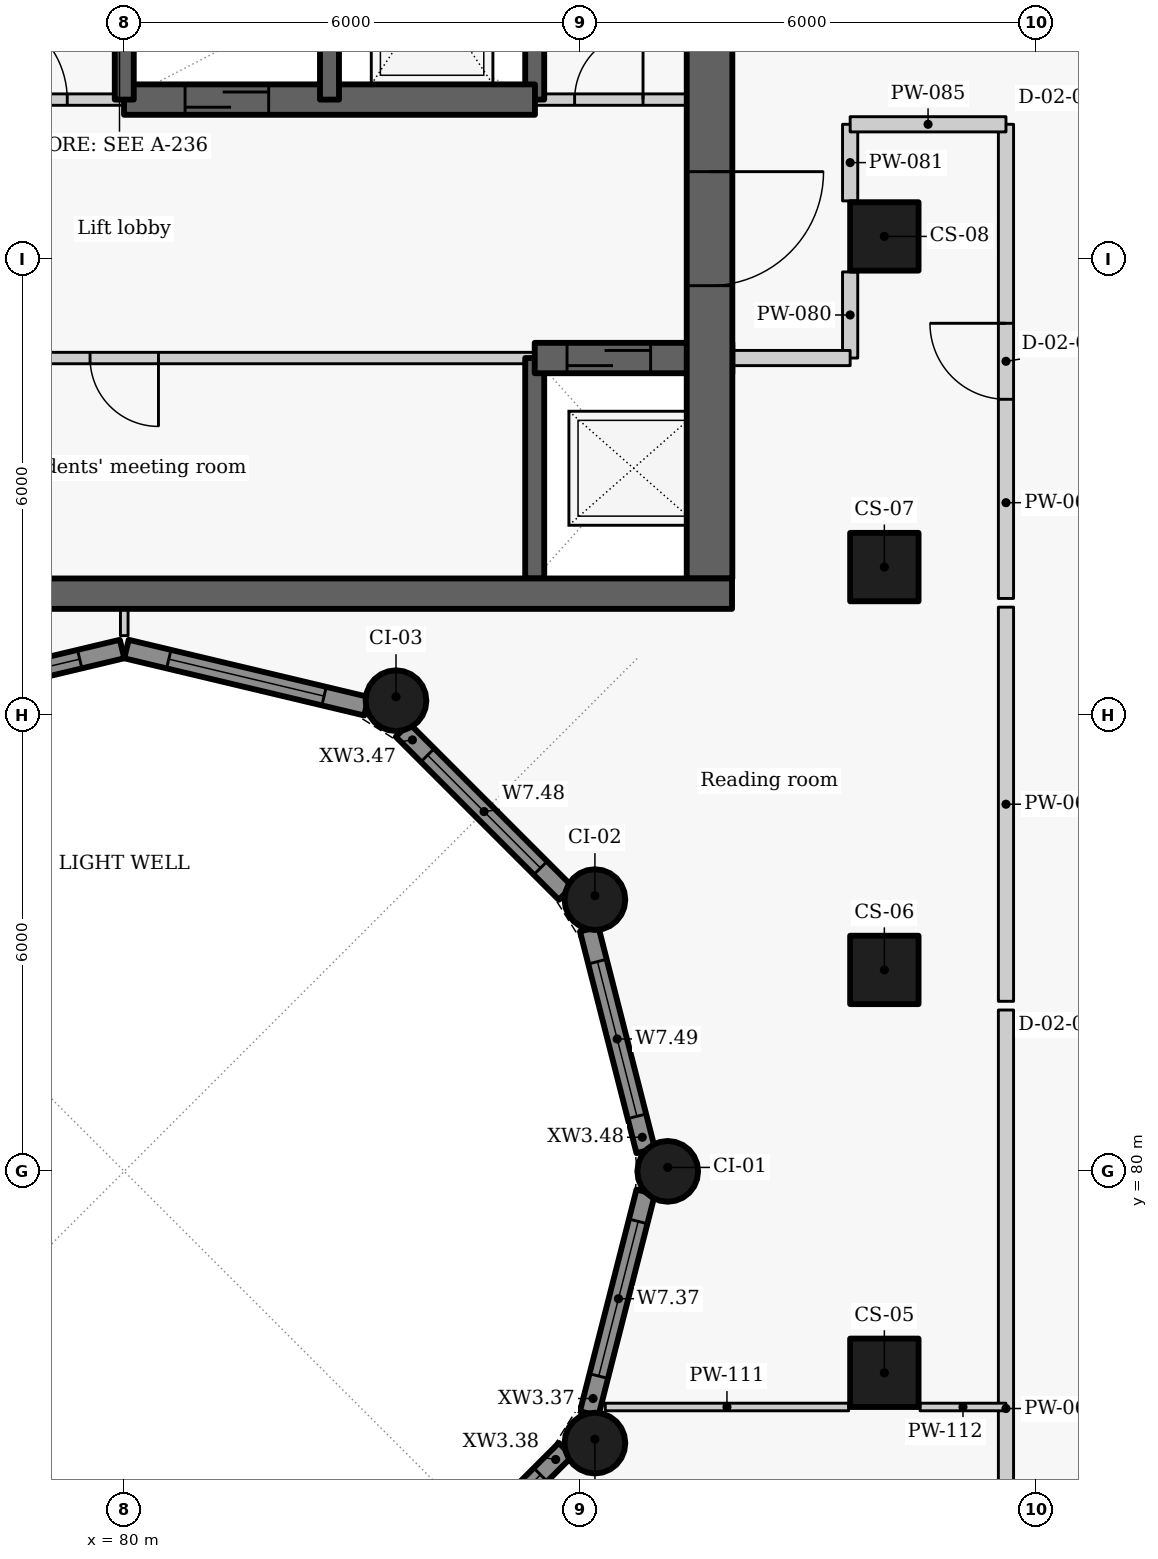
"""IFC4 building model, lengths in metres.
Left out: names, types, materials, properties, quantities, classifications, styles, units other than length and angle.
Written with IfcOpenShell. Run it as: python <this file> out.ifc"""

import sys

from ifc_helpers import new_model, si_unit, direction, frame, frame_2d, origin, origin_2d, place, context, subcontext, project, spatial, rectangle, circle, extrude, element, fill, save


model = new_model("IFC4")
c1 = context("Model", 3, precision=1e-05, world=origin(), true_north=direction((0.0, 1.0)))
c2 = subcontext(c1, "Body", "Model", "MODEL_VIEW")
j1 = project(units=[si_unit("LENGTHUNIT", "METRE"), si_unit("PLANEANGLEUNIT", "RADIAN")], contexts=[c1])
p1 = place(None, origin())
s1 = spatial("IfcSite", under=j1, at=p1, CompositionType="ELEMENT")
p2 = place(p1, origin())
s2 = spatial("IfcBuilding", under=s1, at=p2, CompositionType="ELEMENT")
p3 = place(p2, frame((0.0, 0.0, 213.0)))
s3 = spatial("IfcBuildingStorey", under=s2, at=p3, CompositionType="ELEMENT", Elevation=213.0)
for number, where, z_axis, x_axis in (
    (1, (90.0, 77.35, 0.0), (0.0, 0.0, 1.0), (0.0, 1.0, 0.0)),
    (2, (90.0, 82.65, 0.0), (0.0, 0.0, 1.0), (0.0, 1.0, 0.0)),
    (3, (90.0, 87.95, 0.0), (0.0, 0.0, 1.0), (0.0, 1.0, 0.0)),
    (4, (90.0, 92.3, 0.0), (0.0, 0.0, 1.0), (0.0, 1.0, 0.0)),
):
    element("IfcColumn", number, at=place(p3, frame(where, z_axis=z_axis, x_axis=x_axis)), inside=s3, PredefinedType="COLUMN", context=c2, shape_type="SweptSolid", body=[
        extrude(rectangle(XDim=0.9, YDim=0.9, at=origin_2d()), origin(), (0.0, 0.0, 1.0), 3.3),
    ])
for number, where, z_axis, x_axis in (
    (5, (87.15, 80.0, 0.0), (0.0, 0.0, 1.0), (0.0, 1.0, 0.0)),
    (6, (86.192, 83.575, 0.0), (0.0, 0.0, 1.0), (-0.5, 0.866, 0.0)),
    (7, (83.575, 86.192, 0.0), (0.0, 0.0, 1.0), (-0.866, 0.5, 0.0)),
    (8, (86.192, 76.425, 0.0), (0.0, 0.0, 1.0), (0.5, 0.866, 0.0)),
):
    element("IfcColumn", number, at=place(p3, frame(where, z_axis=z_axis, x_axis=x_axis)), inside=s3, PredefinedType="COLUMN", context=c2, shape_type="SweptSolid", body=[
        extrude(circle(Radius=0.4, at=origin_2d()), origin(), (0.0, 0.0, 1.0), 3.3),
    ])
p4 = place(p3, frame((86.86, 79.73, 0.0), z_axis=(0.0, 0.0, 1.0), x_axis=(-0.247055971283, -0.969001211069, 0.0)))
e9 = element("IfcWall", 9, at=p4, inside=s3, PredefinedType="SOLIDWALL", context=c2, shape_type="SweptSolid", body=[
    extrude(rectangle(XDim=3.01, YDim=0.25, at=frame_2d((1.505, 0.0))), origin(), (0.0, 0.0, 1.0), 2.425),
])
p5 = place(p4, frame((0.401, 0.0, 0.9)))
e10 = element("IfcOpeningElement", 10, at=p5, cuts=e9, PredefinedType="OPENING", context=c2, shape_type="SweptSolid", body=[
    extrude(rectangle(XDim=2.1, YDim=1.1, at=frame_2d((1.05, 0.55))), frame((0.0, 0.135, 0.0), z_axis=(0.0, -1.0, 0.0), x_axis=(1.0, 0.0, 0.0)), (0.0, 0.0, 1.0), 0.27),
])
p6 = place(p3, frame((85.806, 76.339, 0.0), z_axis=(0.0, 0.0, 1.0), x_axis=(-0.707106781187, -0.707106781187, 0.0)))
e11 = element("IfcWall", 11, at=p6, inside=s3, PredefinedType="SOLIDWALL", context=c2, shape_type="SweptSolid", body=[
    extrude(rectangle(XDim=3.033, YDim=0.25, at=frame_2d((1.517, 0.0))), origin(), (0.0, 0.0, 1.0), 2.425),
])
p7 = place(p6, frame((0.467, 0.0, 0.9)))
e12 = element("IfcOpeningElement", 12, at=p7, cuts=e11, PredefinedType="OPENING", context=c2, shape_type="SweptSolid", body=[
    extrude(rectangle(XDim=2.1, YDim=1.1, at=frame_2d((1.05, 0.55))), frame((0.0, 0.135, 0.0), z_axis=(0.0, -1.0, 0.0), x_axis=(1.0, 0.0, 0.0)), (0.0, 0.0, 1.0), 0.27),
])
p8 = place(p3, frame((76.814, 86.119, 0.0), z_axis=(0.0, 0.0, 1.0), x_axis=(0.972773113459, 0.231759508395, 0.0)))
e13 = element("IfcWall", 13, at=p8, inside=s3, PredefinedType="SOLIDWALL", context=c2, shape_type="SweptSolid", body=[
    extrude(rectangle(XDim=3.246, YDim=0.25, at=frame_2d((1.623, 0.0))), origin(), (0.0, 0.0, 1.0), 2.425),
])
p9 = place(p8, frame((0.573, 0.0, 0.9)))
e14 = element("IfcOpeningElement", 14, at=p9, cuts=e13, PredefinedType="OPENING", context=c2, shape_type="SweptSolid", body=[
    extrude(rectangle(XDim=2.1, YDim=1.1, at=frame_2d((1.05, 0.55))), frame((0.0, 0.135, 0.0), z_axis=(0.0, -1.0, 0.0), x_axis=(1.0, 0.0, 0.0)), (0.0, 0.0, 1.0), 0.27),
])
p10 = place(p3, frame((80.029, 86.872, 0.0), z_axis=(0.0, 0.0, 1.0), x_axis=(0.972773113459, -0.231759508395, 0.0)))
e15 = element("IfcWall", 15, at=p10, inside=s3, PredefinedType="SOLIDWALL", context=c2, shape_type="SweptSolid", body=[
    extrude(rectangle(XDim=3.246, YDim=0.25, at=frame_2d((1.623, 0.0))), origin(), (0.0, 0.0, 1.0), 2.425),
])
p11 = place(p10, frame((0.573, 0.0, 0.9)))
e16 = element("IfcOpeningElement", 16, at=p11, cuts=e15, PredefinedType="OPENING", context=c2, shape_type="SweptSolid", body=[
    extrude(rectangle(XDim=2.1, YDim=1.1, at=frame_2d((1.05, 0.55))), frame((0.0, 0.135, 0.0), z_axis=(0.0, -1.0, 0.0), x_axis=(1.0, 0.0, 0.0)), (0.0, 0.0, 1.0), 0.27),
])
p12 = place(p3, frame((83.661, 85.806, 0.0), z_axis=(0.0, 0.0, 1.0), x_axis=(0.707106781187, -0.707106781187, 0.0)))
e17 = element("IfcWall", 17, at=p12, inside=s3, PredefinedType="SOLIDWALL", context=c2, shape_type="SweptSolid", body=[
    extrude(rectangle(XDim=3.033, YDim=0.25, at=frame_2d((1.517, 0.0))), origin(), (0.0, 0.0, 1.0), 2.425),
])
p13 = place(p12, frame((0.467, 0.0, 0.9)))
e18 = element("IfcOpeningElement", 18, at=p13, cuts=e17, PredefinedType="OPENING", context=c2, shape_type="SweptSolid", body=[
    extrude(rectangle(XDim=2.1, YDim=1.1, at=frame_2d((1.05, 0.55))), frame((0.0, 0.135, 0.0), z_axis=(0.0, -1.0, 0.0), x_axis=(1.0, 0.0, 0.0)), (0.0, 0.0, 1.0), 0.27),
])
p14 = place(p3, frame((86.117, 83.187, 0.0), z_axis=(0.0, 0.0, 1.0), x_axis=(0.247055971283, -0.969001211069, 0.0)))
e19 = element("IfcWall", 19, at=p14, inside=s3, PredefinedType="SOLIDWALL", context=c2, shape_type="SweptSolid", body=[
    extrude(rectangle(XDim=3.01, YDim=0.25, at=frame_2d((1.505, 0.0))), origin(), (0.0, 0.0, 1.0), 2.425),
])
p15 = place(p14, frame((0.441, 0.0, 0.9)))
e20 = element("IfcOpeningElement", 20, at=p15, cuts=e19, PredefinedType="OPENING", context=c2, shape_type="SweptSolid", body=[
    extrude(rectangle(XDim=2.1, YDim=1.1, at=frame_2d((1.05, 0.55))), frame((0.0, 0.135, 0.0), z_axis=(0.0, -1.0, 0.0), x_axis=(1.0, 0.0, 0.0)), (0.0, 0.0, 1.0), 0.27),
])
p16 = place(p3, frame((85.4, 90.7, 0.0), z_axis=(0.0, 0.0, 1.0), x_axis=(-1.0, 0.0, 0.0)))
e21 = element("IfcWall", 21, at=p16, inside=s3, PredefinedType="PARTITIONING", context=c2, shape_type="SweptSolid", body=[
    extrude(rectangle(XDim=13.4, YDim=0.15, at=frame_2d((6.7, 0.0))), origin(), (0.0, 0.0, 1.0), 3.025),
])
p17 = place(p16, frame((11.325, 0.0, 0.0)))
e22 = element("IfcOpeningElement", 22, at=p17, cuts=e21, PredefinedType="OPENING", context=c2, shape_type="SweptSolid", body=[
    extrude(rectangle(XDim=0.9, YDim=2.1, at=frame_2d((0.45, 1.05))), frame((0.0, 0.085, 0.0), z_axis=(0.0, -1.0, 0.0), x_axis=(1.0, 0.0, 0.0)), (0.0, 0.0, 1.0), 0.17),
])
p18 = place(p16, frame((4.95, 0.0, 0.0)))
e23 = element("IfcOpeningElement", 23, at=p18, cuts=e21, PredefinedType="OPENING", context=c2, shape_type="SweptSolid", body=[
    extrude(rectangle(XDim=0.9, YDim=2.1, at=frame_2d((0.45, 1.05))), frame((0.0, 0.085, 0.0), z_axis=(0.0, -1.0, 0.0), x_axis=(1.0, 0.0, 0.0)), (0.0, 0.0, 1.0), 0.17),
])
p19 = place(p3, frame((85.4, 87.8, -0.275), z_axis=(0.0, 0.0, 1.0), x_axis=(0.0, 1.0, 0.0)))
e24 = element("IfcWall", 24, at=p19, inside=s3, PredefinedType="SHEAR", context=c2, shape_type="SweptSolid", body=[
    extrude(rectangle(XDim=2.9, YDim=0.25, at=frame_2d((1.45, 0.0))), origin(), (0.0, 0.0, 1.0), 3.3),
])
p20 = place(p3, frame((85.4, 94.1, -0.275), z_axis=(0.0, 0.0, 1.0), x_axis=(0.0, 1.0, 0.0)))
e25 = element("IfcWall", 25, at=p20, inside=s3, PredefinedType="SHEAR", context=c2, shape_type="SweptSolid", body=[
    extrude(rectangle(XDim=2.8, YDim=0.25, at=frame_2d((1.4, 0.0))), origin(), (0.0, 0.0, 1.0), 3.3),
])
p21 = place(p3, frame((85.4, 90.7, -0.275), z_axis=(0.0, 0.0, 1.0), x_axis=(1.0, 0.0, 0.0)))
e26 = element("IfcWall", 26, at=p21, inside=s3, PredefinedType="SHEAR", context=c2, shape_type="SweptSolid", body=[
    extrude(rectangle(XDim=2.6, YDim=0.4, at=frame_2d((1.3, 0.0))), origin(), (0.0, 0.0, 1.0), 3.3),
])
p22 = place(p21, frame((0.425, 0.0, 0.275)))
e27 = element("IfcOpeningElement", 27, at=p22, cuts=e26, PredefinedType="OPENING", context=c2, shape_type="SweptSolid", body=[
    extrude(rectangle(XDim=1.1, YDim=2.1, at=frame_2d((0.55, 1.05))), frame((0.0, 0.21, 0.0), z_axis=(0.0, -1.0, 0.0), x_axis=(1.0, 0.0, 0.0)), (0.0, 0.0, 1.0), 0.42),
])
p23 = place(p3, frame((87.7, 102.05, -0.275), z_axis=(0.0, 0.0, 1.0), x_axis=(0.0, -1.0, 0.0)))
e28 = element("IfcWall", 28, at=p23, inside=s3, PredefinedType="SHEAR", context=c2, shape_type="SweptSolid", body=[
    extrude(rectangle(XDim=14.25, YDim=0.6, at=frame_2d((7.125, 0.0))), origin(), (0.0, 0.0, 1.0), 3.3),
])
p24 = place(p23, frame((8.898, 0.0, 0.275)))
e29 = element("IfcOpeningElement", 29, at=p24, cuts=e28, PredefinedType="OPENING", context=c2, shape_type="SweptSolid", body=[
    extrude(rectangle(XDim=1.5, YDim=2.1, at=frame_2d((0.75, 1.05))), frame((0.0, 0.31, 0.0), z_axis=(0.0, -1.0, 0.0), x_axis=(1.0, 0.0, 0.0)), (0.0, 0.0, 1.0), 0.62),
])
p25 = place(p3, frame((77.297, 94.1, 0.0), z_axis=(0.0, 0.0, 1.0), x_axis=(1.0, 0.0, 0.0)))
e30 = element("IfcWall", 30, at=p25, inside=s3, PredefinedType="PARTITIONING", context=c2, shape_type="SweptSolid", body=[
    extrude(rectangle(XDim=2.706, YDim=0.15, at=frame_2d((1.353, 0.0))), origin(), (0.0, 0.0, 1.0), 3.025),
])
p26 = place(p25, frame((0.753, 0.0, 0.0)))
e31 = element("IfcOpeningElement", 31, at=p26, cuts=e30, PredefinedType="OPENING", context=c2, shape_type="SweptSolid", body=[
    extrude(rectangle(XDim=1.2, YDim=2.1, at=frame_2d((0.6, 1.05))), frame((0.0, 0.085, 0.0), z_axis=(0.0, -1.0, 0.0), x_axis=(1.0, 0.0, 0.0)), (0.0, 0.0, 1.0), 0.17),
])
p27 = place(p3, frame((85.397, 94.1, 0.0), z_axis=(0.0, 0.0, 1.0), x_axis=(1.0, 0.0, 0.0)))
e32 = element("IfcWall", 32, at=p27, inside=s3, PredefinedType="PARTITIONING", context=c2, shape_type="SweptSolid", body=[
    extrude(rectangle(XDim=2.603, YDim=0.15, at=frame_2d((1.302, 0.0))), origin(), (0.0, 0.0, 1.0), 3.025),
])
p28 = place(p27, frame((0.528, 0.0, 0.0)))
e33 = element("IfcOpeningElement", 33, at=p28, cuts=e32, PredefinedType="OPENING", context=c2, shape_type="SweptSolid", body=[
    extrude(rectangle(XDim=0.9, YDim=2.1, at=frame_2d((0.45, 1.05))), frame((0.0, 0.085, 0.0), z_axis=(0.0, -1.0, 0.0), x_axis=(1.0, 0.0, 0.0)), (0.0, 0.0, 1.0), 0.17),
])
p29 = place(p3, frame((79.997, 94.1, -0.275), z_axis=(0.0, 0.0, 1.0), x_axis=(1.0, 0.0, 0.0)))
e34 = element("IfcWall", 34, at=p29, inside=s3, PredefinedType="SHEAR", context=c2, shape_type="SweptSolid", body=[
    extrude(rectangle(XDim=5.406, YDim=0.4, at=frame_2d((2.703, 0.0))), origin(), (0.0, 0.0, 1.0), 3.3),
])
p30 = place(p29, frame((0.803, 0.0, 0.275)))
e35 = element("IfcOpeningElement", 35, at=p30, cuts=e34, PredefinedType="OPENING", context=c2, shape_type="SweptSolid", body=[
    extrude(rectangle(XDim=1.1, YDim=2.1, at=frame_2d((0.55, 1.05))), frame((0.0, 0.21, 0.0), z_axis=(0.0, -1.0, 0.0), x_axis=(1.0, 0.0, 0.0)), (0.0, 0.0, 1.0), 0.42),
])
for number, where, z_axis, x_axis in (
    (36, (80.0, 94.1, -0.275), (0.0, 0.0, 1.0), (0.0, 1.0, 0.0)),
    (37, (82.7, 94.1, -0.275), (0.0, 0.0, 1.0), (0.0, 1.0, 0.0)),
):
    element("IfcWall", number, at=place(p3, frame(where, z_axis=z_axis, x_axis=x_axis)), inside=s3, PredefinedType="SHEAR", context=c2, shape_type="SweptSolid", body=[
        extrude(rectangle(XDim=2.8, YDim=0.25, at=frame_2d((1.4, 0.0))), origin(), (0.0, 0.0, 1.0), 3.3),
    ])
p31 = place(p3, frame((91.6, 71.637, 0.0), z_axis=(0.0, 0.0, 1.0), x_axis=(0.0, 1.0, 0.0)))
e38 = element("IfcWall", 38, at=p31, inside=s3, PredefinedType="PARTITIONING", context=c2, shape_type="SweptSolid", body=[
    extrude(rectangle(XDim=10.486, YDim=0.2, at=frame_2d((5.243, 0.0))), origin(), (0.0, 0.0, 1.0), 3.025),
])
p32 = place(p3, frame((91.6, 82.237, 0.0), z_axis=(0.0, 0.0, 1.0), x_axis=(0.0, 1.0, 0.0)))
e39 = element("IfcWall", 39, at=p32, inside=s3, PredefinedType="PARTITIONING", context=c2, shape_type="SweptSolid", body=[
    extrude(rectangle(XDim=5.186, YDim=0.2, at=frame_2d((2.593, 0.0))), origin(), (0.0, 0.0, 1.0), 3.025),
])
p33 = place(p3, frame((91.6, 87.537, 0.0), z_axis=(0.0, 0.0, 1.0), x_axis=(0.0, 1.0, 0.0)))
e40 = element("IfcWall", 40, at=p33, inside=s3, PredefinedType="PARTITIONING", context=c2, shape_type="SweptSolid", body=[
    extrude(rectangle(XDim=6.238, YDim=0.2, at=frame_2d((3.119, 0.0))), origin(), (0.0, 0.0, 1.0), 3.025),
])
p34 = place(p33, frame((2.62, 0.0, 0.0)))
e41 = element("IfcOpeningElement", 41, at=p34, cuts=e40, PredefinedType="OPENING", context=c2, shape_type="SweptSolid", body=[
    extrude(rectangle(XDim=1.0, YDim=2.1, at=frame_2d((0.5, 1.05))), frame((0.0, 0.11, 0.0), z_axis=(0.0, -1.0, 0.0), x_axis=(1.0, 0.0, 0.0)), (0.0, 0.0, 1.0), 0.22),
])
p35 = place(p3, frame((89.55, 90.7, 0.0), z_axis=(0.0, 0.0, 1.0), x_axis=(0.0, 1.0, 0.0)))
e42 = element("IfcWall", 42, at=p35, inside=s3, PredefinedType="PARTITIONING", context=c2, shape_type="SweptSolid", body=[
    extrude(rectangle(XDim=1.133, YDim=0.2, at=frame_2d((0.566, 0.0))), origin(), (0.0, 0.0, 1.0), 3.025),
])
p36 = place(p3, frame((89.55, 92.767, 0.0), z_axis=(0.0, 0.0, 1.0), x_axis=(0.0, 1.0, 0.0)))
e43 = element("IfcWall", 43, at=p36, inside=s3, PredefinedType="PARTITIONING", context=c2, shape_type="SweptSolid", body=[
    extrude(rectangle(XDim=1.008, YDim=0.2, at=frame_2d((0.504, 0.0))), origin(), (0.0, 0.0, 1.0), 3.025),
])
p37 = place(p3, frame((89.55, 93.775, 0.0), z_axis=(0.0, 0.0, 1.0), x_axis=(1.0, 0.0, 0.0)))
e44 = element("IfcWall", 44, at=p37, inside=s3, PredefinedType="PARTITIONING", context=c2, shape_type="SweptSolid", body=[
    extrude(rectangle(XDim=2.05, YDim=0.2, at=frame_2d((1.025, 0.0))), origin(), (0.0, 0.0, 1.0), 2.505),
])
p38 = place(p3, frame((88.0, 90.7, 0.0), z_axis=(0.0, 0.0, 1.0), x_axis=(1.0, 0.0, 0.0)))
e45 = element("IfcWall", 45, at=p38, inside=s3, PredefinedType="PARTITIONING", context=c2, shape_type="SweptSolid", body=[
    extrude(rectangle(XDim=1.55, YDim=0.2, at=frame_2d((0.775, 0.0))), origin(), (0.0, 0.0, 1.0), 3.025),
])
p39 = place(p3, frame((80.0, 87.048, 0.0), z_axis=(0.0, 0.0, 1.0), x_axis=(0.0, 1.0, 0.0)))
e46 = element("IfcWall", 46, at=p39, inside=s3, PredefinedType="PARTITIONING", context=c2, shape_type="SweptSolid", body=[
    extrude(rectangle(XDim=0.352, YDim=0.1, at=frame_2d((0.176, 0.0))), origin(), (0.0, 0.0, 1.0), 3.025),
])
p40 = place(p3, frame((86.328, 76.9, 0.0), z_axis=(0.0, 0.0, 1.0), x_axis=(1.0, 0.0, 0.0)))
e47 = element("IfcWall", 47, at=p40, inside=s3, PredefinedType="PARTITIONING", context=c2, shape_type="SweptSolid", body=[
    extrude(rectangle(XDim=3.202, YDim=0.1, at=frame_2d((1.601, 0.0))), origin(), (0.0, 0.0, 1.0), 3.025),
])
p41 = place(p3, frame((90.47, 76.9, 0.0), z_axis=(0.0, 0.0, 1.0), x_axis=(1.0, 0.0, 0.0)))
e48 = element("IfcWall", 48, at=p41, inside=s3, PredefinedType="PARTITIONING", context=c2, shape_type="SweptSolid", body=[
    extrude(rectangle(XDim=1.129, YDim=0.1, at=frame_2d((0.564, 0.0))), origin(), (0.0, 0.0, 1.0), 3.025),
])
p42 = place(p3, frame((72.004, 87.6, -0.275), z_axis=(0.0, 0.0, 1.0), x_axis=(1.0, 0.0, 0.0)))
e49 = element("IfcWall", 49, at=p42, inside=s3, PredefinedType="SHEAR", context=c2, shape_type="SweptSolid", body=[
    extrude(rectangle(XDim=15.992, YDim=0.4, at=frame_2d((7.996, 0.0))), origin(), (0.0, 0.0, 1.0), 3.3),
])
p43 = place(p5, origin())
e50 = element("IfcWindow", 50, at=p43, inside=s3, PartitioningType="SINGLE_PANEL", PredefinedType="WINDOW", context=c2, shape_type="SweptSolid", body=[
    extrude(rectangle(XDim=2.1, YDim=1.1, at=frame_2d((1.05, 0.55))), frame((0.0, 0.03, 0.0), z_axis=(0.0, -1.0, 0.0), x_axis=(1.0, 0.0, 0.0)), (0.0, 0.0, 1.0), 0.06),
])
fill(e10, e50)
p44 = place(p7, origin())
e51 = element("IfcWindow", 51, at=p44, inside=s3, PartitioningType="SINGLE_PANEL", PredefinedType="WINDOW", context=c2, shape_type="SweptSolid", body=[
    extrude(rectangle(XDim=2.1, YDim=1.1, at=frame_2d((1.05, 0.55))), frame((0.0, 0.03, 0.0), z_axis=(0.0, -1.0, 0.0), x_axis=(1.0, 0.0, 0.0)), (0.0, 0.0, 1.0), 0.06),
])
fill(e12, e51)
p45 = place(p9, origin())
e52 = element("IfcWindow", 52, at=p45, inside=s3, PartitioningType="SINGLE_PANEL", PredefinedType="WINDOW", context=c2, shape_type="SweptSolid", body=[
    extrude(rectangle(XDim=2.1, YDim=1.1, at=frame_2d((1.05, 0.55))), frame((0.0, 0.03, 0.0), z_axis=(0.0, -1.0, 0.0), x_axis=(1.0, 0.0, 0.0)), (0.0, 0.0, 1.0), 0.06),
])
fill(e14, e52)
p46 = place(p11, origin())
e53 = element("IfcWindow", 53, at=p46, inside=s3, PartitioningType="SINGLE_PANEL", PredefinedType="WINDOW", context=c2, shape_type="SweptSolid", body=[
    extrude(rectangle(XDim=2.1, YDim=1.1, at=frame_2d((1.05, 0.55))), frame((0.0, 0.03, 0.0), z_axis=(0.0, -1.0, 0.0), x_axis=(1.0, 0.0, 0.0)), (0.0, 0.0, 1.0), 0.06),
])
fill(e16, e53)
p47 = place(p13, origin())
e54 = element("IfcWindow", 54, at=p47, inside=s3, PartitioningType="SINGLE_PANEL", PredefinedType="WINDOW", context=c2, shape_type="SweptSolid", body=[
    extrude(rectangle(XDim=2.1, YDim=1.1, at=frame_2d((1.05, 0.55))), frame((0.0, 0.03, 0.0), z_axis=(0.0, -1.0, 0.0), x_axis=(1.0, 0.0, 0.0)), (0.0, 0.0, 1.0), 0.06),
])
fill(e18, e54)
p48 = place(p15, origin())
e55 = element("IfcWindow", 55, at=p48, inside=s3, PartitioningType="SINGLE_PANEL", PredefinedType="WINDOW", context=c2, shape_type="SweptSolid", body=[
    extrude(rectangle(XDim=2.1, YDim=1.1, at=frame_2d((1.05, 0.55))), frame((0.0, 0.03, 0.0), z_axis=(0.0, -1.0, 0.0), x_axis=(1.0, 0.0, 0.0)), (0.0, 0.0, 1.0), 0.06),
])
fill(e20, e55)
p49 = place(p22, origin())
e56 = element("IfcDoor", 56, at=p49, inside=s3, OperationType="SLIDING_TO_LEFT", PredefinedType="DOOR", context=c2, shape_type="SweptSolid", body=[
    extrude(rectangle(XDim=1.1, YDim=2.1, at=frame_2d((0.55, 1.05))), frame((0.0, 0.025, 0.0), z_axis=(0.0, -1.0, 0.0), x_axis=(1.0, 0.0, 0.0)), (0.0, 0.0, 1.0), 0.05),
])
fill(e27, e56)
p50 = place(p18, origin())
e57 = element("IfcDoor", 57, at=p50, inside=s3, OperationType="SINGLE_SWING_LEFT", PredefinedType="DOOR", context=c2, shape_type="SweptSolid", body=[
    extrude(rectangle(XDim=0.9, YDim=2.1, at=frame_2d((0.45, 1.05))), frame((0.0, 0.025, 0.0), z_axis=(0.0, -1.0, 0.0), x_axis=(1.0, 0.0, 0.0)), (0.0, 0.0, 1.0), 0.05),
])
fill(e23, e57)
p51 = place(p26, origin())
e58 = element("IfcDoor", 58, at=p51, inside=s3, OperationType="DOUBLE_DOOR_SINGLE_SWING", PredefinedType="DOOR", context=c2, shape_type="SweptSolid", body=[
    extrude(rectangle(XDim=1.2, YDim=2.1, at=frame_2d((0.6, 1.05))), frame((0.0, 0.025, 0.0), z_axis=(0.0, -1.0, 0.0), x_axis=(1.0, 0.0, 0.0)), (0.0, 0.0, 1.0), 0.05),
])
fill(e31, e58)
p52 = place(p30, origin())
e59 = element("IfcDoor", 59, at=p52, inside=s3, OperationType="SLIDING_TO_LEFT", PredefinedType="DOOR", context=c2, shape_type="SweptSolid", body=[
    extrude(rectangle(XDim=1.1, YDim=2.1, at=frame_2d((0.55, 1.05))), frame((0.0, 0.025, 0.0), z_axis=(0.0, -1.0, 0.0), x_axis=(1.0, 0.0, 0.0)), (0.0, 0.0, 1.0), 0.05),
])
fill(e35, e59)
p53 = place(p28, origin())
e60 = element("IfcDoor", 60, at=p53, inside=s3, OperationType="SINGLE_SWING_RIGHT", PredefinedType="DOOR", context=c2, shape_type="SweptSolid", body=[
    extrude(rectangle(XDim=0.9, YDim=2.1, at=frame_2d((0.45, 1.05))), frame((0.0, 0.025, 0.0), z_axis=(0.0, -1.0, 0.0), x_axis=(1.0, 0.0, 0.0)), (0.0, 0.0, 1.0), 0.05),
])
fill(e33, e60)
p54 = place(p34, origin())
e61 = element("IfcDoor", 61, at=p54, inside=s3, OperationType="SINGLE_SWING_RIGHT", PredefinedType="DOOR", context=c2, shape_type="SweptSolid", body=[
    extrude(rectangle(XDim=1.0, YDim=2.1, at=frame_2d((0.5, 1.05))), frame((0.0, 0.025, 0.0), z_axis=(0.0, -1.0, 0.0), x_axis=(1.0, 0.0, 0.0)), (0.0, 0.0, 1.0), 0.05),
])
fill(e41, e61)
p55 = place(p24, origin())
e62 = element("IfcDoor", 62, at=p55, inside=s3, OperationType="DOUBLE_DOOR_SINGLE_SWING", PredefinedType="DOOR", context=c2, shape_type="SweptSolid", body=[
    extrude(rectangle(XDim=1.5, YDim=2.1, at=frame_2d((0.75, 1.05))), frame((0.0, 0.025, 0.0), z_axis=(0.0, -1.0, 0.0), x_axis=(1.0, 0.0, 0.0)), (0.0, 0.0, 1.0), 0.05),
])
fill(e29, e62)
save(model, sys.argv[1])
